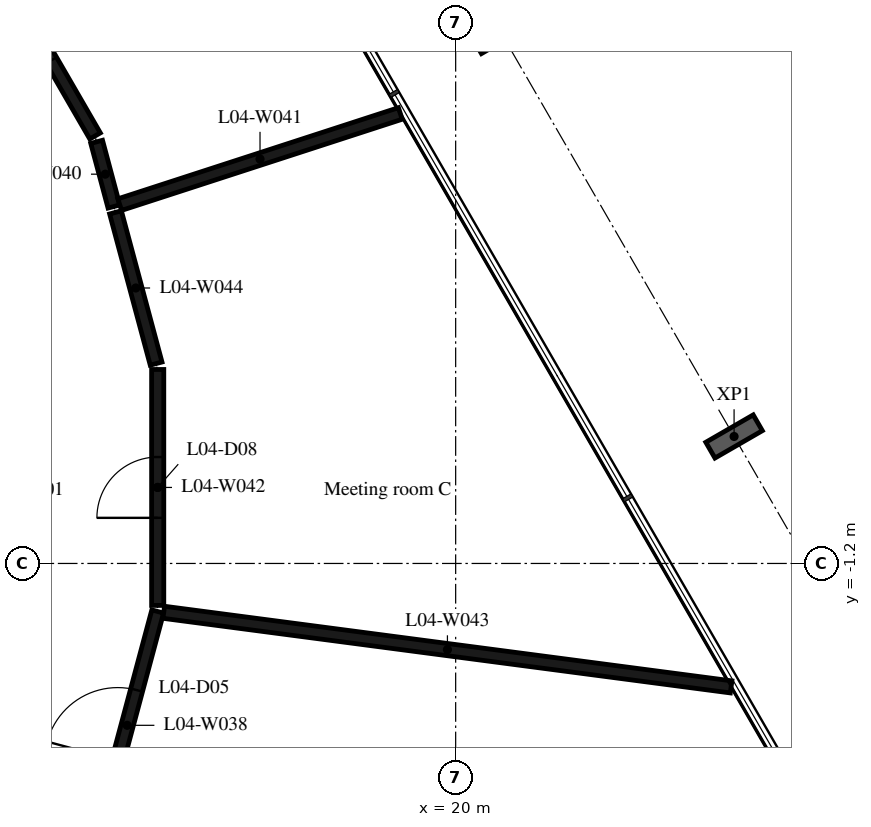
"""IFC4 building model, lengths in metres.
Left out: names, types, materials, properties, quantities, classifications, styles, units other than length and angle.
Written with IfcOpenShell. Run it as: python <this file> out.ifc"""

import sys

from ifc_helpers import new_model, si_unit, direction, frame, frame_2d, origin, origin_2d, place, context, subcontext, project, spatial, rectangle, i_section, extrude, element, fill, save


model = new_model("IFC4")
c1 = context("Model", 3, precision=1e-05, world=origin(), true_north=direction((0.0, 1.0)))
c2 = subcontext(c1, "Body", "Model", "MODEL_VIEW")
j1 = project(units=[si_unit("LENGTHUNIT", "METRE"), si_unit("PLANEANGLEUNIT", "RADIAN")], contexts=[c1])
p1 = place(None, origin())
s1 = spatial("IfcSite", under=j1, at=p1, CompositionType="ELEMENT")
p2 = place(p1, origin())
s2 = spatial("IfcBuilding", under=s1, at=p2, CompositionType="ELEMENT")
p3 = place(p2, frame((0.0, 0.0, 23.4)))
s3 = spatial("IfcBuildingStorey", under=s2, at=p3, CompositionType="ELEMENT", Elevation=23.4)
for number, where, z_axis, x_axis in (
    (1, (24.579, 0.888, -0.38), (0.0, 0.0, 1.0), (0.5, -0.866, 0.0)),
    (2, (20.739, 7.539, -0.38), (0.0, 0.0, 1.0), (0.5, -0.866, 0.0)),
):
    element("IfcColumn", number, at=place(p3, frame(where, z_axis=z_axis, x_axis=x_axis)), inside=s3, PredefinedType="COLUMN", context=c2, shape_type="SweptSolid", body=[
        extrude(i_section(OverallWidth=0.3, OverallDepth=0.9, WebThickness=0.019, FlangeThickness=0.035, FilletRadius=0.03, at=origin_2d()), origin(), (0.0, 0.0, 1.0), 4.8),
    ])
p4 = place(p3, frame((14.096, -5.733, 0.0), z_axis=(0.0, 0.0, 1.0), x_axis=(0.259085569159, 0.96585437197, 0.0)))
e3 = element("IfcWall", 3, at=p4, inside=s3, PredefinedType="PARTITIONING", context=c2, shape_type="SweptSolid", body=[
    extrude(rectangle(XDim=3.876, YDim=0.2, at=frame_2d((1.938, 0.0))), origin(), (0.0, 0.0, 1.0), 4.42),
])
p5 = place(p4, frame((1.338, 0.0, 0.0)))
e4 = element("IfcOpeningElement", 4, at=p5, cuts=e3, PredefinedType="OPENING", context=c2, shape_type="SweptSolid", body=[
    extrude(rectangle(XDim=1.2, YDim=2.1, at=frame_2d((0.6, 1.05))), frame((0.0, 0.11, 0.0), z_axis=(0.0, -1.0, 0.0), x_axis=(1.0, 0.0, 0.0)), (0.0, 0.0, 1.0), 0.22),
])
p6 = place(p3, frame((14.07, 5.83, 0.0), z_axis=(0.0, 0.0, 1.0), x_axis=(-0.500760497952, 0.865585884642, 0.0)))
e5 = element("IfcWall", 5, at=p6, inside=s3, PredefinedType="PARTITIONING", context=c2, shape_type="SweptSolid", body=[
    extrude(rectangle(XDim=3.874, YDim=0.2, at=frame_2d((1.937, 0.0))), origin(), (0.0, 0.0, 1.0), 4.42),
])
p7 = place(p6, frame((1.437, 0.0, 0.0)))
e6 = element("IfcOpeningElement", 6, at=p7, cuts=e5, PredefinedType="OPENING", context=c2, shape_type="SweptSolid", body=[
    extrude(rectangle(XDim=1.0, YDim=2.1, at=frame_2d((0.5, 1.05))), frame((0.0, 0.11, 0.0), z_axis=(0.0, -1.0, 0.0), x_axis=(1.0, 0.0, 0.0)), (0.0, 0.0, 1.0), 0.22),
])
p8 = place(p3, frame((14.38, 4.67, 0.0), z_axis=(0.0, 0.0, 1.0), x_axis=(-0.258159565639, 0.966102292032, 0.0)))
e7 = element("IfcWall", 7, at=p8, inside=s3, PredefinedType="PARTITIONING", context=c2, shape_type="SweptSolid", body=[
    extrude(rectangle(XDim=1.101, YDim=0.2, at=frame_2d((0.55, 0.0))), origin(), (0.0, 0.0, 1.0), 4.42),
])
p9 = place(p3, frame((14.475, 4.701, 0.0), z_axis=(0.0, 0.0, 1.0), x_axis=(0.951085450377, 0.308927930239, 0.0)))
e8 = element("IfcWall", 8, at=p9, inside=s3, PredefinedType="PARTITIONING", context=c2, shape_type="SweptSolid", body=[
    extrude(rectangle(XDim=4.852, YDim=0.2, at=frame_2d((2.426, 0.0))), origin(), (0.0, 0.0, 1.0), 4.03),
])
p10 = place(p3, frame((15.1, -1.89, 0.0), z_axis=(0.0, 0.0, 1.0), x_axis=(0.0, 1.0, 0.0)))
e9 = element("IfcWall", 9, at=p10, inside=s3, PredefinedType="PARTITIONING", context=c2, shape_type="SweptSolid", body=[
    extrude(rectangle(XDim=3.88, YDim=0.2, at=frame_2d((1.94, 0.0))), origin(), (0.0, 0.0, 1.0), 4.42),
])
p11 = place(p10, frame((1.44, 0.0, 0.0)))
e10 = element("IfcOpeningElement", 10, at=p11, cuts=e9, PredefinedType="OPENING", context=c2, shape_type="SweptSolid", body=[
    extrude(rectangle(XDim=1.0, YDim=2.1, at=frame_2d((0.5, 1.05))), frame((0.0, 0.11, 0.0), z_axis=(0.0, -1.0, 0.0), x_axis=(1.0, 0.0, 0.0)), (0.0, 0.0, 1.0), 0.22),
])
p12 = place(p3, frame((15.199, -2.003, 0.0), z_axis=(0.0, 0.0, 1.0), x_axis=(0.991463740717, -0.130382709146, 0.0)))
e11 = element("IfcWall", 11, at=p12, inside=s3, PredefinedType="PARTITIONING", context=c2, shape_type="SweptSolid", body=[
    extrude(rectangle(XDim=9.411, YDim=0.2, at=frame_2d((4.706, 0.0))), origin(), (0.0, 0.0, 1.0), 4.42),
])
p13 = place(p3, frame((15.074, 2.087, 0.0), z_axis=(0.0, 0.0, 1.0), x_axis=(-0.259408996071, 0.965767556277, 0.0)))
e12 = element("IfcWall", 12, at=p13, inside=s3, PredefinedType="PARTITIONING", context=c2, shape_type="SweptSolid", body=[
    extrude(rectangle(XDim=2.575, YDim=0.2, at=frame_2d((1.288, 0.0))), origin(), (0.0, 0.0, 1.0), 4.42),
])
p14 = place(p5, origin())
e13 = element("IfcDoor", 13, at=p14, inside=s3, OperationType="SINGLE_SWING_LEFT", PredefinedType="DOOR", context=c2, shape_type="SweptSolid", body=[
    extrude(rectangle(XDim=1.2, YDim=2.1, at=frame_2d((0.6, 1.05))), frame((0.0, 0.025, 0.0), z_axis=(0.0, -1.0, 0.0), x_axis=(1.0, 0.0, 0.0)), (0.0, 0.0, 1.0), 0.05),
])
fill(e4, e13)
p15 = place(p11, origin())
e14 = element("IfcDoor", 14, at=p15, inside=s3, OperationType="SINGLE_SWING_LEFT", PredefinedType="DOOR", context=c2, shape_type="SweptSolid", body=[
    extrude(rectangle(XDim=1.0, YDim=2.1, at=frame_2d((0.5, 1.05))), frame((0.0, 0.025, 0.0), z_axis=(0.0, -1.0, 0.0), x_axis=(1.0, 0.0, 0.0)), (0.0, 0.0, 1.0), 0.05),
])
fill(e10, e14)
save(model, sys.argv[1])
